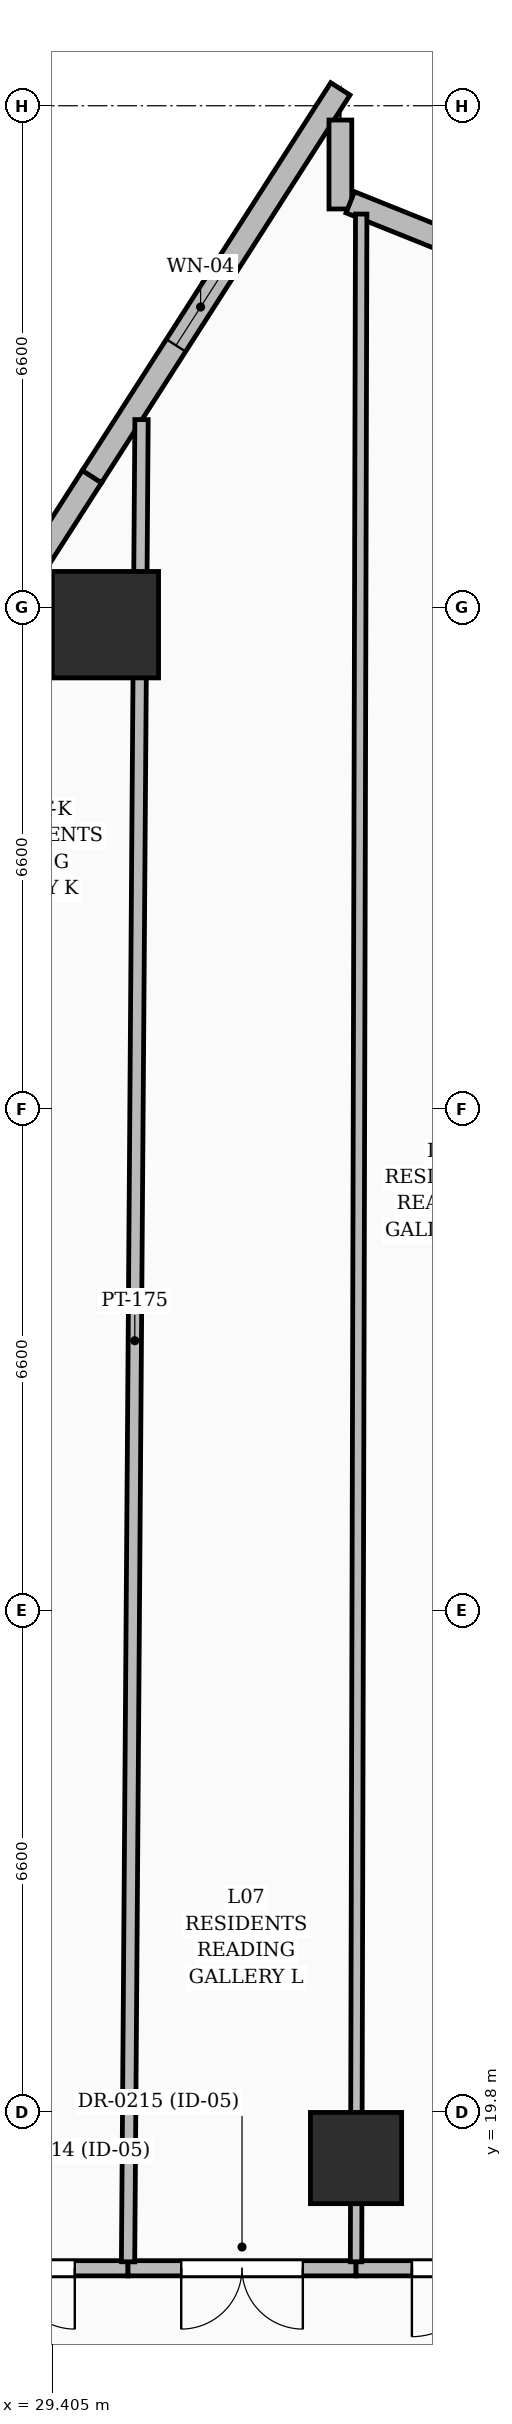
"""IFC4 building model, lengths in metres.
Left out: names, types, materials, properties, quantities, classifications, styles, units other than length and angle.
Written with IfcOpenShell. Run it as: python <this file> out.ifc"""

import sys

from ifc_helpers import new_model, si_unit, direction, frame, frame_2d, origin, origin_2d, place, context, subcontext, project, spatial, rectangle, extrude, element, fill, save


model = new_model("IFC4")
c1 = context("Model", 3, precision=1e-05, world=origin(), true_north=direction((0.0, 1.0)))
c2 = subcontext(c1, "Body", "Model", "MODEL_VIEW")
j1 = project(units=[si_unit("LENGTHUNIT", "METRE"), si_unit("PLANEANGLEUNIT", "RADIAN")], contexts=[c1])
p1 = place(None, origin())
s1 = spatial("IfcSite", under=j1, at=p1, CompositionType="ELEMENT")
p2 = place(p1, origin())
s2 = spatial("IfcBuilding", under=s1, at=p2, CompositionType="ELEMENT")
p3 = place(p2, frame((0.0, 0.0, 35.4)))
s3 = spatial("IfcBuildingStorey", under=s2, at=p3, CompositionType="ELEMENT", Elevation=35.4)
p4 = place(p3, frame((33.4, 19.2, 0.0), z_axis=(0.0, 0.0, 1.0), x_axis=(1.0, 0.0, 0.0)))
e1 = element("IfcColumn", 1, at=p4, inside=s3, PredefinedType="COLUMN", context=c2, shape_type="SweptSolid", body=[
    extrude(rectangle(XDim=1.2, YDim=1.2, at=origin_2d()), origin(), (0.0, 0.0, 1.0), 3.6),
])
p5 = place(p3, frame((30.102, 39.373, 0.0), z_axis=(0.0, 0.0, 1.0), x_axis=(1.0, 0.0, 0.0)))
e2 = element("IfcColumn", 2, at=p5, inside=s3, PredefinedType="COLUMN", context=c2, shape_type="SweptSolid", body=[
    extrude(rectangle(XDim=1.4, YDim=1.4, at=origin_2d()), origin(), (0.0, 0.0, 1.0), 3.6),
])
p6 = place(p3, frame((26.657, 36.22, 0.0), z_axis=(0.0, 0.0, 1.0), x_axis=(0.539506453767, 0.841981464371, 0.0)))
e3 = element("IfcWall", 3, at=p6, inside=s3, PredefinedType="SOLIDWALL", context=c2, shape_type="SweptSolid", body=[
    extrude(rectangle(XDim=6.058, YDim=0.3, at=frame_2d((3.029, 0.0))), origin(), (0.0, 0.0, 1.0), 3.35),
])
p7 = place(p6, frame((2.275, 0.0, 0.6)))
e4 = element("IfcOpeningElement", 4, at=p7, cuts=e3, PredefinedType="OPENING", context=c2, shape_type="SweptSolid", body=[
    extrude(rectangle(XDim=1.5, YDim=2.1, at=frame_2d((0.75, 1.05))), frame((0.0, 0.16, 0.0), z_axis=(0.0, -1.0, 0.0), x_axis=(1.0, 0.0, 0.0)), (0.0, 0.0, 1.0), 0.32),
])
p8 = place(p3, frame((29.925, 41.321, 0.0), z_axis=(0.0, 0.0, 1.0), x_axis=(0.53953502124, 0.841963158847, 0.0)))
e5 = element("IfcWall", 5, at=p8, inside=s3, PredefinedType="SOLIDWALL", context=c2, shape_type="SweptSolid", body=[
    extrude(rectangle(XDim=6.059, YDim=0.3, at=frame_2d((3.029, 0.0))), origin(), (0.0, 0.0, 1.0), 3.35),
])
p9 = place(p8, frame((2.05, 0.0, 0.8)))
e6 = element("IfcOpeningElement", 6, at=p9, cuts=e5, PredefinedType="OPENING", context=c2, shape_type="SweptSolid", body=[
    extrude(rectangle(XDim=1.2, YDim=1.8, at=frame_2d((0.6, 0.9))), frame((0.0, 0.16, 0.0), z_axis=(0.0, -1.0, 0.0), x_axis=(1.0, 0.0, 0.0)), (0.0, 0.0, 1.0), 0.32),
])
p10 = place(p3, frame((33.194, 46.012, 0.0), z_axis=(0.0, 0.0, 1.0), x_axis=(0.0, -1.0, 0.0)))
e7 = element("IfcWall", 7, at=p10, inside=s3, PredefinedType="SOLIDWALL", context=c2, shape_type="SweptSolid", body=[
    extrude(rectangle(XDim=1.17, YDim=0.3, at=frame_2d((0.585, 0.0))), origin(), (0.0, 0.0, 1.0), 3.35),
])
p11 = place(p3, frame((33.324, 44.93, 0.0), z_axis=(0.0, 0.0, 1.0), x_axis=(0.928091921944, -0.372351157407, 0.0)))
e8 = element("IfcWall", 8, at=p11, inside=s3, PredefinedType="SOLIDWALL", context=c2, shape_type="SweptSolid", body=[
    extrude(rectangle(XDim=3.023, YDim=0.3, at=frame_2d((1.512, 0.0))), origin(), (0.0, 0.0, 1.0), 3.35),
])
p12 = place(p3, frame((30.4, 17.75, 0.0), z_axis=(0.0, 0.0, 1.0), x_axis=(-1.0, 0.0, 0.0)))
e9 = element("IfcWall", 9, at=p12, inside=s3, PredefinedType="PARTITIONING", context=c2, shape_type="SweptSolid", body=[
    extrude(rectangle(XDim=3.0, YDim=0.2, at=frame_2d((1.5, 0.0))), origin(), (0.0, 0.0, 1.0), 3.35),
])
p13 = place(p12, frame((0.7, 0.0, 0.0)))
e10 = element("IfcOpeningElement", 10, at=p13, cuts=e9, PredefinedType="OPENING", context=c2, shape_type="SweptSolid", body=[
    extrude(rectangle(XDim=1.6, YDim=2.3, at=frame_2d((0.8, 1.15))), frame((0.0, 0.11, 0.0), z_axis=(0.0, -1.0, 0.0), x_axis=(1.0, 0.0, 0.0)), (0.0, 0.0, 1.0), 0.22),
])
p14 = place(p3, frame((33.4, 17.75, 0.0), z_axis=(0.0, 0.0, 1.0), x_axis=(-1.0, 0.0, 0.0)))
e11 = element("IfcWall", 11, at=p14, inside=s3, PredefinedType="PARTITIONING", context=c2, shape_type="SweptSolid", body=[
    extrude(rectangle(XDim=3.0, YDim=0.2, at=frame_2d((1.5, 0.0))), origin(), (0.0, 0.0, 1.0), 3.35),
])
p15 = place(p14, frame((0.7, 0.0, 0.0)))
e12 = element("IfcOpeningElement", 12, at=p15, cuts=e11, PredefinedType="OPENING", context=c2, shape_type="SweptSolid", body=[
    extrude(rectangle(XDim=1.6, YDim=2.3, at=frame_2d((0.8, 1.15))), frame((0.0, 0.11, 0.0), z_axis=(0.0, -1.0, 0.0), x_axis=(1.0, 0.0, 0.0)), (0.0, 0.0, 1.0), 0.22),
])
p16 = place(p3, frame((35.77, 17.75, 0.0), z_axis=(0.0, 0.0, 1.0), x_axis=(-1.0, 0.0, 0.0)))
e13 = element("IfcWall", 13, at=p16, inside=s3, PredefinedType="PARTITIONING", context=c2, shape_type="SweptSolid", body=[
    extrude(rectangle(XDim=2.37, YDim=0.2, at=frame_2d((1.185, 0.0))), origin(), (0.0, 0.0, 1.0), 2.309),
])
p17 = place(p16, frame((0.735, 0.0, 0.0)))
e14 = element("IfcOpeningElement", 14, at=p17, cuts=e13, PredefinedType="OPENING", context=c2, shape_type="SweptSolid", body=[
    extrude(rectangle(XDim=0.9, YDim=2.1, at=frame_2d((0.45, 1.05))), frame((0.0, 0.11, 0.0), z_axis=(0.0, -1.0, 0.0), x_axis=(1.0, 0.0, 0.0)), (0.0, 0.0, 1.0), 0.22),
])
p18 = place(p3, frame((30.401, 17.835, 0.0), z_axis=(0.0, 0.0, 1.0), x_axis=(0.007313118493, 0.999973258791, 0.0)))
e15 = element("IfcWall", 15, at=p18, inside=s3, PredefinedType="PARTITIONING", context=c2, shape_type="SweptSolid", body=[
    extrude(rectangle(XDim=24.237, YDim=0.175, at=frame_2d((12.118, 0.0))), origin(), (0.0, 0.0, 1.0), 2.228),
])
p19 = place(p3, frame((33.4, 17.835, 0.0), z_axis=(0.0, 0.0, 1.0), x_axis=(0.002519340237, 0.999996826457, 0.0)))
e16 = element("IfcWall", 16, at=p19, inside=s3, PredefinedType="PARTITIONING", context=c2, shape_type="SweptSolid", body=[
    extrude(rectangle(XDim=26.94, YDim=0.15, at=frame_2d((13.47, 0.0))), origin(), (0.0, 0.0, 1.0), 2.228),
])
p20 = place(p9, origin())
e17 = element("IfcWindow", 17, at=p20, inside=s3, PartitioningType="SINGLE_PANEL", PredefinedType="WINDOW", context=c2, shape_type="SweptSolid", body=[
    extrude(rectangle(XDim=1.2, YDim=1.8, at=frame_2d((0.6, 0.9))), frame((0.0, 0.03, 0.0), z_axis=(0.0, -1.0, 0.0), x_axis=(1.0, 0.0, 0.0)), (0.0, 0.0, 1.0), 0.06),
])
fill(e6, e17)
p21 = place(p13, origin())
e18 = element("IfcDoor", 18, at=p21, inside=s3, OperationType="DOUBLE_DOOR_SINGLE_SWING", PredefinedType="DOOR", context=c2, shape_type="SweptSolid", body=[
    extrude(rectangle(XDim=1.6, YDim=2.3, at=frame_2d((0.8, 1.15))), frame((0.0, 0.025, 0.0), z_axis=(0.0, -1.0, 0.0), x_axis=(1.0, 0.0, 0.0)), (0.0, 0.0, 1.0), 0.05),
])
fill(e10, e18)
p22 = place(p15, origin())
e19 = element("IfcDoor", 19, at=p22, inside=s3, OperationType="DOUBLE_DOOR_SINGLE_SWING", PredefinedType="DOOR", context=c2, shape_type="SweptSolid", body=[
    extrude(rectangle(XDim=1.6, YDim=2.3, at=frame_2d((0.8, 1.15))), frame((0.0, 0.025, 0.0), z_axis=(0.0, -1.0, 0.0), x_axis=(1.0, 0.0, 0.0)), (0.0, 0.0, 1.0), 0.05),
])
fill(e12, e19)
p23 = place(p17, origin())
e20 = element("IfcDoor", 20, at=p23, inside=s3, OperationType="SINGLE_SWING_RIGHT", PredefinedType="DOOR", context=c2, shape_type="SweptSolid", body=[
    extrude(rectangle(XDim=0.9, YDim=2.1, at=frame_2d((0.45, 1.05))), frame((0.0, 0.025, 0.0), z_axis=(0.0, -1.0, 0.0), x_axis=(1.0, 0.0, 0.0)), (0.0, 0.0, 1.0), 0.05),
])
fill(e14, e20)
save(model, sys.argv[1])
